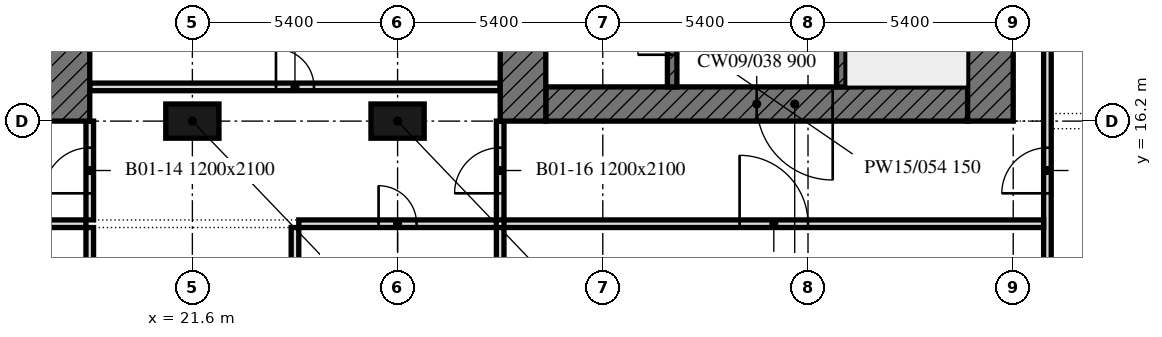
"""IFC4 building model, lengths in metres.
Left out: names, types, materials, properties, quantities, classifications, styles, units other than length and angle.
Written with IfcOpenShell. Run it as: python <this file> out.ifc"""

import sys

from ifc_helpers import new_model, si_unit, direction, frame, frame_2d, origin, origin_2d, place, context, subcontext, project, spatial, rectangle, extrude, element, fill, save


model = new_model("IFC4")
c1 = context("Model", 3, precision=1e-05, world=origin(), true_north=direction((0.0, 1.0)))
c2 = subcontext(c1, "Body", "Model", "MODEL_VIEW")
j1 = project(units=[si_unit("LENGTHUNIT", "METRE"), si_unit("PLANEANGLEUNIT", "RADIAN")], contexts=[c1])
p1 = place(None, origin())
s1 = spatial("IfcSite", under=j1, at=p1, CompositionType="ELEMENT")
p2 = place(p1, origin())
s2 = spatial("IfcBuilding", under=s1, at=p2, CompositionType="ELEMENT")
p3 = place(p2, frame((0.0, 0.0, -4.5)))
s3 = spatial("IfcBuildingStorey", under=s2, at=p3, CompositionType="ELEMENT", Elevation=-4.5)
for number, where, z_axis, x_axis in (
    (1, (21.6, 16.2, 0.0), (0.0, 0.0, 1.0), (1.0, 0.0, 0.0)),
    (2, (27.0, 16.2, 0.0), (0.0, 0.0, 1.0), (1.0, 0.0, 0.0)),
):
    element("IfcColumn", number, at=place(p3, frame(where, z_axis=z_axis, x_axis=x_axis)), inside=s3, PredefinedType="COLUMN", context=c2, shape_type="SweptSolid", body=[
        extrude(rectangle(XDim=1.4, YDim=0.9, at=origin_2d()), origin(), (0.0, 0.0, 1.0), 4.0),
    ])
p4 = place(p3, frame((44.1, 4.4, 0.0), z_axis=(0.0, 0.0, 1.0), x_axis=(0.0, 1.0, 0.0)))
e3 = element("IfcWall", 3, at=p4, inside=s3, PredefinedType="PARTITIONING", context=c2, shape_type="SweptSolid", body=[
    extrude(rectangle(XDim=39.8, YDim=0.2, at=frame_2d((19.9, 0.0))), origin(), (0.0, 0.0, 1.0), 4.0),
])
p5 = place(p4, frame((9.9, 0.0, 0.0)))
e4 = element("IfcOpeningElement", 4, at=p5, cuts=e3, PredefinedType="OPENING", context=c2, shape_type="SweptSolid", body=[
    extrude(rectangle(XDim=1.2, YDim=2.1, at=frame_2d((0.6, 1.05))), frame((0.0, 0.11, 0.0), z_axis=(0.0, -1.0, 0.0), x_axis=(1.0, 0.0, 0.0)), (0.0, 0.0, 1.0), 0.22),
])
p6 = place(p4, frame((28.7, 0.0, 0.0)))
e5 = element("IfcOpeningElement", 5, at=p6, cuts=e3, PredefinedType="OPENING", context=c2, shape_type="SweptSolid", body=[
    extrude(rectangle(XDim=1.2, YDim=2.1, at=frame_2d((0.6, 1.05))), frame((0.0, 0.11, 0.0), z_axis=(0.0, -1.0, 0.0), x_axis=(1.0, 0.0, 0.0)), (0.0, 0.0, 1.0), 0.22),
])
for number, where, z_axis, x_axis in (
    (6, (18.9, 4.6, 0.0), (0.0, 0.0, 1.0), (0.0, 1.0, 0.0)),
    (7, (24.3, 4.6, 0.0), (0.0, 0.0, 1.0), (0.0, 1.0, 0.0)),
    (8, (29.7, 4.6, 0.0), (0.0, 0.0, 1.0), (0.0, 1.0, 0.0)),
):
    element("IfcWall", number, at=place(p3, frame(where, z_axis=z_axis, x_axis=x_axis)), inside=s3, PredefinedType="PARTITIONING", context=c2, shape_type="SweptSolid", body=[
        extrude(rectangle(XDim=8.8, YDim=0.2, at=frame_2d((4.4, 0.0))), origin(), (0.0, 0.0, 1.0), 4.0),
    ])
p7 = place(p3, frame((4.6, 13.5, 0.0), z_axis=(0.0, 0.0, 1.0), x_axis=(1.0, 0.0, 0.0)))
e9 = element("IfcWall", 9, at=p7, inside=s3, PredefinedType="PARTITIONING", context=c2, shape_type="SweptSolid", body=[
    extrude(rectangle(XDim=14.2, YDim=0.2, at=frame_2d((7.1, 0.0))), origin(), (0.0, 0.0, 1.0), 4.0),
])
p8 = place(p7, frame((6.6, 0.0, 0.0)))
e10 = element("IfcOpeningElement", 10, at=p8, cuts=e9, PredefinedType="OPENING", context=c2, shape_type="SweptSolid", body=[
    extrude(rectangle(XDim=1.0, YDim=2.1, at=frame_2d((0.5, 1.05))), frame((0.0, 0.11, 0.0), z_axis=(0.0, -1.0, 0.0), x_axis=(1.0, 0.0, 0.0)), (0.0, 0.0, 1.0), 0.22),
])
p9 = place(p3, frame((24.4, 13.5, 0.0), z_axis=(0.0, 0.0, 1.0), x_axis=(1.0, 0.0, 0.0)))
e11 = element("IfcWall", 11, at=p9, inside=s3, PredefinedType="PARTITIONING", context=c2, shape_type="SweptSolid", body=[
    extrude(rectangle(XDim=5.2, YDim=0.2, at=frame_2d((2.6, 0.0))), origin(), (0.0, 0.0, 1.0), 4.0),
])
p10 = place(p9, frame((2.1, 0.0, 0.0)))
e12 = element("IfcOpeningElement", 12, at=p10, cuts=e11, PredefinedType="OPENING", context=c2, shape_type="SweptSolid", body=[
    extrude(rectangle(XDim=1.0, YDim=2.1, at=frame_2d((0.5, 1.05))), frame((0.0, 0.11, 0.0), z_axis=(0.0, -1.0, 0.0), x_axis=(1.0, 0.0, 0.0)), (0.0, 0.0, 1.0), 0.22),
])
p11 = place(p3, frame((29.8, 13.5, 0.0), z_axis=(0.0, 0.0, 1.0), x_axis=(1.0, 0.0, 0.0)))
e13 = element("IfcWall", 13, at=p11, inside=s3, PredefinedType="PARTITIONING", context=c2, shape_type="SweptSolid", body=[
    extrude(rectangle(XDim=14.2, YDim=0.2, at=frame_2d((7.1, 0.0))), origin(), (0.0, 0.0, 1.0), 4.0),
])
p12 = place(p11, frame((6.2, 0.0, 0.0)))
e14 = element("IfcOpeningElement", 14, at=p12, cuts=e13, PredefinedType="OPENING", context=c2, shape_type="SweptSolid", body=[
    extrude(rectangle(XDim=1.8, YDim=2.1, at=frame_2d((0.9, 1.05))), frame((0.0, 0.11, 0.0), z_axis=(0.0, -1.0, 0.0), x_axis=(1.0, 0.0, 0.0)), (0.0, 0.0, 1.0), 0.22),
])
p13 = place(p3, frame((18.9, 13.6, 0.0), z_axis=(0.0, 0.0, 1.0), x_axis=(0.0, 1.0, 0.0)))
e15 = element("IfcWall", 15, at=p13, inside=s3, PredefinedType="PARTITIONING", context=c2, shape_type="SweptSolid", body=[
    extrude(rectangle(XDim=2.6, YDim=0.2, at=frame_2d((1.3, 0.0))), origin(), (0.0, 0.0, 1.0), 4.0),
])
p14 = place(p13, frame((0.7, 0.0, 0.0)))
e16 = element("IfcOpeningElement", 16, at=p14, cuts=e15, PredefinedType="OPENING", context=c2, shape_type="SweptSolid", body=[
    extrude(rectangle(XDim=1.2, YDim=2.1, at=frame_2d((0.6, 1.05))), frame((0.0, 0.11, 0.0), z_axis=(0.0, -1.0, 0.0), x_axis=(1.0, 0.0, 0.0)), (0.0, 0.0, 1.0), 0.22),
])
p15 = place(p3, frame((29.7, 13.6, 0.0), z_axis=(0.0, 0.0, 1.0), x_axis=(0.0, 1.0, 0.0)))
e17 = element("IfcWall", 17, at=p15, inside=s3, PredefinedType="PARTITIONING", context=c2, shape_type="SweptSolid", body=[
    extrude(rectangle(XDim=2.6, YDim=0.2, at=frame_2d((1.3, 0.0))), origin(), (0.0, 0.0, 1.0), 4.0),
])
p16 = place(p15, frame((0.7, 0.0, 0.0)))
e18 = element("IfcOpeningElement", 18, at=p16, cuts=e17, PredefinedType="OPENING", context=c2, shape_type="SweptSolid", body=[
    extrude(rectangle(XDim=1.2, YDim=2.1, at=frame_2d((0.6, 1.05))), frame((0.0, 0.11, 0.0), z_axis=(0.0, -1.0, 0.0), x_axis=(1.0, 0.0, 0.0)), (0.0, 0.0, 1.0), 0.22),
])
p17 = place(p3, frame((18.9, 17.1, 0.0), z_axis=(0.0, 0.0, 1.0), x_axis=(1.0, 0.0, 0.0)))
e19 = element("IfcWall", 19, at=p17, inside=s3, PredefinedType="PARTITIONING", context=c2, shape_type="SweptSolid", body=[
    extrude(rectangle(XDim=10.8, YDim=0.2, at=frame_2d((5.4, 0.0))), origin(), (0.0, 0.0, 1.0), 4.0),
])
p18 = place(p17, frame((4.9, 0.0, 0.0)))
e20 = element("IfcOpeningElement", 20, at=p18, cuts=e19, PredefinedType="OPENING", context=c2, shape_type="SweptSolid", body=[
    extrude(rectangle(XDim=1.0, YDim=2.1, at=frame_2d((0.5, 1.05))), frame((0.0, 0.11, 0.0), z_axis=(0.0, -1.0, 0.0), x_axis=(1.0, 0.0, 0.0)), (0.0, 0.0, 1.0), 0.22),
])
p19 = place(p3, frame((18.3, 32.4, 0.0), z_axis=(0.0, 0.0, 1.0), x_axis=(0.0, -1.0, 0.0)))
e21 = element("IfcWall", 21, at=p19, inside=s3, PredefinedType="SOLIDWALL", context=c2, shape_type="SweptSolid", body=[
    extrude(rectangle(XDim=16.2, YDim=1.2, at=frame_2d((8.1, 0.0))), origin(), (0.0, 0.0, 1.0), 4.0),
])
p20 = place(p3, frame((42.0, 16.65, 0.0), z_axis=(0.0, 0.0, 1.0), x_axis=(-1.0, 0.0, 0.0)))
e22 = element("IfcWall", 22, at=p20, inside=s3, PredefinedType="SOLIDWALL", context=c2, shape_type="SweptSolid", body=[
    extrude(rectangle(XDim=11.1, YDim=0.9, at=frame_2d((5.55, 0.0))), origin(), (0.0, 0.0, 1.0), 4.0),
])
p21 = place(p20, frame((3.55, 0.0, 0.0)))
e23 = element("IfcOpeningElement", 23, at=p21, cuts=e22, PredefinedType="OPENING", context=c2, shape_type="SweptSolid", body=[
    extrude(rectangle(XDim=2.0, YDim=2.4, at=frame_2d((1.0, 1.2))), frame((0.0, 0.45, 0.0), z_axis=(0.0, -1.0, 0.0), x_axis=(1.0, 0.0, 0.0)), (0.0, 0.0, 1.0), 0.9),
])
for number, where, z_axis, x_axis in (
    (24, (42.6, 32.4, 0.0), (0.0, 0.0, 1.0), (0.0, -1.0, 0.0)),
    (25, (30.3, 16.2, 0.0), (0.0, 0.0, 1.0), (0.0, 1.0, 0.0)),
):
    element("IfcWall", number, at=place(p3, frame(where, z_axis=z_axis, x_axis=x_axis)), inside=s3, PredefinedType="SOLIDWALL", context=c2, shape_type="SweptSolid", body=[
        extrude(rectangle(XDim=16.2, YDim=1.2, at=frame_2d((8.1, 0.0))), origin(), (0.0, 0.0, 1.0), 4.0),
    ])
p22 = place(p3, frame((38.675, 17.1, 0.0), z_axis=(0.0, 0.0, 1.0), x_axis=(0.0, 1.0, 0.0)))
e26 = element("IfcWall", 26, at=p22, inside=s3, PredefinedType="SOLIDWALL", context=c2, shape_type="SweptSolid", body=[
    extrude(rectangle(XDim=14.4, YDim=0.25, at=frame_2d((7.2, 0.0))), origin(), (0.0, 0.0, 1.0), 4.0),
])
p23 = place(p22, frame((4.6, 0.0, 0.0)))
e27 = element("IfcOpeningElement", 27, at=p23, cuts=e26, PredefinedType="OPENING", context=c2, shape_type="SweptSolid", body=[
    extrude(rectangle(XDim=1.0, YDim=2.1, at=frame_2d((0.5, 1.05))), frame((0.0, 0.125, 0.0), z_axis=(0.0, -1.0, 0.0), x_axis=(1.0, 0.0, 0.0)), (0.0, 0.0, 1.0), 0.25),
])
p24 = place(p22, frame((7.062, 0.0, 0.0)))
e28 = element("IfcOpeningElement", 28, at=p24, cuts=e26, PredefinedType="OPENING", context=c2, shape_type="SweptSolid", body=[
    extrude(rectangle(XDim=1.2, YDim=2.1, at=frame_2d((0.6, 1.05))), frame((0.0, 0.125, 0.0), z_axis=(0.0, -1.0, 0.0), x_axis=(1.0, 0.0, 0.0)), (0.0, 0.0, 1.0), 0.25),
])
p25 = place(p22, frame((9.925, 0.0, 0.0)))
e29 = element("IfcOpeningElement", 29, at=p25, cuts=e26, PredefinedType="OPENING", context=c2, shape_type="SweptSolid", body=[
    extrude(rectangle(XDim=1.1, YDim=2.1, at=frame_2d((0.55, 1.05))), frame((0.0, 0.125, 0.0), z_axis=(0.0, -1.0, 0.0), x_axis=(1.0, 0.0, 0.0)), (0.0, 0.0, 1.0), 0.25),
])
p26 = place(p22, frame((12.587, 0.0, 0.0)))
e30 = element("IfcOpeningElement", 30, at=p26, cuts=e26, PredefinedType="OPENING", context=c2, shape_type="SweptSolid", body=[
    extrude(rectangle(XDim=1.1, YDim=2.1, at=frame_2d((0.55, 1.05))), frame((0.0, 0.125, 0.0), z_axis=(0.0, -1.0, 0.0), x_axis=(1.0, 0.0, 0.0)), (0.0, 0.0, 1.0), 0.25),
])
p27 = place(p3, frame((34.225, 17.1, 0.0), z_axis=(0.0, 0.0, 1.0), x_axis=(0.0, 1.0, 0.0)))
e31 = element("IfcWall", 31, at=p27, inside=s3, PredefinedType="SOLIDWALL", context=c2, shape_type="SweptSolid", body=[
    extrude(rectangle(XDim=14.4, YDim=0.25, at=frame_2d((7.2, 0.0))), origin(), (0.0, 0.0, 1.0), 4.0),
])
p28 = place(p27, frame((13.15, 0.0, 0.0)))
e32 = element("IfcOpeningElement", 32, at=p28, cuts=e31, PredefinedType="OPENING", context=c2, shape_type="SweptSolid", body=[
    extrude(rectangle(XDim=1.0, YDim=2.1, at=frame_2d((0.5, 1.05))), frame((0.0, 0.125, 0.0), z_axis=(0.0, -1.0, 0.0), x_axis=(1.0, 0.0, 0.0)), (0.0, 0.0, 1.0), 0.25),
])
p29 = place(p27, frame((0.846, 0.0, 0.0)))
e33 = element("IfcOpeningElement", 33, at=p29, cuts=e31, PredefinedType="OPENING", context=c2, shape_type="SweptSolid", body=[
    extrude(rectangle(XDim=0.9, YDim=2.1, at=frame_2d((0.45, 1.05))), frame((0.0, 0.125, 0.0), z_axis=(0.0, -1.0, 0.0), x_axis=(1.0, 0.0, 0.0)), (0.0, 0.0, 1.0), 0.25),
])
p30 = place(p27, frame((3.346, 0.0, 0.0)))
e34 = element("IfcOpeningElement", 34, at=p30, cuts=e31, PredefinedType="OPENING", context=c2, shape_type="SweptSolid", body=[
    extrude(rectangle(XDim=0.9, YDim=2.1, at=frame_2d((0.45, 1.05))), frame((0.0, 0.125, 0.0), z_axis=(0.0, -1.0, 0.0), x_axis=(1.0, 0.0, 0.0)), (0.0, 0.0, 1.0), 0.25),
])
p31 = place(p5, origin())
e35 = element("IfcDoor", 35, at=p31, inside=s3, OperationType="SINGLE_SWING_LEFT", PredefinedType="DOOR", context=c2, shape_type="SweptSolid", body=[
    extrude(rectangle(XDim=1.2, YDim=2.1, at=frame_2d((0.6, 1.05))), frame((0.0, 0.025, 0.0), z_axis=(0.0, -1.0, 0.0), x_axis=(1.0, 0.0, 0.0)), (0.0, 0.0, 1.0), 0.05),
])
fill(e4, e35)
p32 = place(p10, origin())
e36 = element("IfcDoor", 36, at=p32, inside=s3, OperationType="SINGLE_SWING_LEFT", PredefinedType="DOOR", context=c2, shape_type="SweptSolid", body=[
    extrude(rectangle(XDim=1.0, YDim=2.1, at=frame_2d((0.5, 1.05))), frame((0.0, 0.025, 0.0), z_axis=(0.0, -1.0, 0.0), x_axis=(1.0, 0.0, 0.0)), (0.0, 0.0, 1.0), 0.05),
])
fill(e12, e36)
p33 = place(p12, origin())
e37 = element("IfcDoor", 37, at=p33, inside=s3, OperationType="DOUBLE_DOOR_SINGLE_SWING", PredefinedType="DOOR", context=c2, shape_type="SweptSolid", body=[
    extrude(rectangle(XDim=1.8, YDim=2.1, at=frame_2d((0.9, 1.05))), frame((0.0, 0.025, 0.0), z_axis=(0.0, -1.0, 0.0), x_axis=(1.0, 0.0, 0.0)), (0.0, 0.0, 1.0), 0.05),
])
fill(e14, e37)
p34 = place(p14, origin())
e38 = element("IfcDoor", 38, at=p34, inside=s3, OperationType="SINGLE_SWING_LEFT", PredefinedType="DOOR", context=c2, shape_type="SweptSolid", body=[
    extrude(rectangle(XDim=1.2, YDim=2.1, at=frame_2d((0.6, 1.05))), frame((0.0, 0.025, 0.0), z_axis=(0.0, -1.0, 0.0), x_axis=(1.0, 0.0, 0.0)), (0.0, 0.0, 1.0), 0.05),
])
fill(e16, e38)
p35 = place(p16, origin())
e39 = element("IfcDoor", 39, at=p35, inside=s3, OperationType="SINGLE_SWING_LEFT", PredefinedType="DOOR", context=c2, shape_type="SweptSolid", body=[
    extrude(rectangle(XDim=1.2, YDim=2.1, at=frame_2d((0.6, 1.05))), frame((0.0, 0.025, 0.0), z_axis=(0.0, -1.0, 0.0), x_axis=(1.0, 0.0, 0.0)), (0.0, 0.0, 1.0), 0.05),
])
fill(e18, e39)
p36 = place(p18, origin())
e40 = element("IfcDoor", 40, at=p36, inside=s3, OperationType="SINGLE_SWING_LEFT", PredefinedType="DOOR", context=c2, shape_type="SweptSolid", body=[
    extrude(rectangle(XDim=1.0, YDim=2.1, at=frame_2d((0.5, 1.05))), frame((0.0, 0.025, 0.0), z_axis=(0.0, -1.0, 0.0), x_axis=(1.0, 0.0, 0.0)), (0.0, 0.0, 1.0), 0.05),
])
fill(e20, e40)
p37 = place(p21, origin())
e41 = element("IfcDoor", 41, at=p37, inside=s3, OperationType="DOUBLE_DOOR_SINGLE_SWING", PredefinedType="DOOR", context=c2, shape_type="SweptSolid", body=[
    extrude(rectangle(XDim=2.0, YDim=2.4, at=frame_2d((1.0, 1.2))), frame((0.0, 0.025, 0.0), z_axis=(0.0, -1.0, 0.0), x_axis=(1.0, 0.0, 0.0)), (0.0, 0.0, 1.0), 0.05),
])
fill(e23, e41)
p38 = place(p29, origin())
e42 = element("IfcDoor", 42, at=p38, inside=s3, OperationType="SINGLE_SWING_LEFT", PredefinedType="DOOR", context=c2, shape_type="SweptSolid", body=[
    extrude(rectangle(XDim=0.9, YDim=2.1, at=frame_2d((0.45, 1.05))), frame((0.0, 0.025, 0.0), z_axis=(0.0, -1.0, 0.0), x_axis=(1.0, 0.0, 0.0)), (0.0, 0.0, 1.0), 0.05),
])
fill(e33, e42)
save(model, sys.argv[1])
